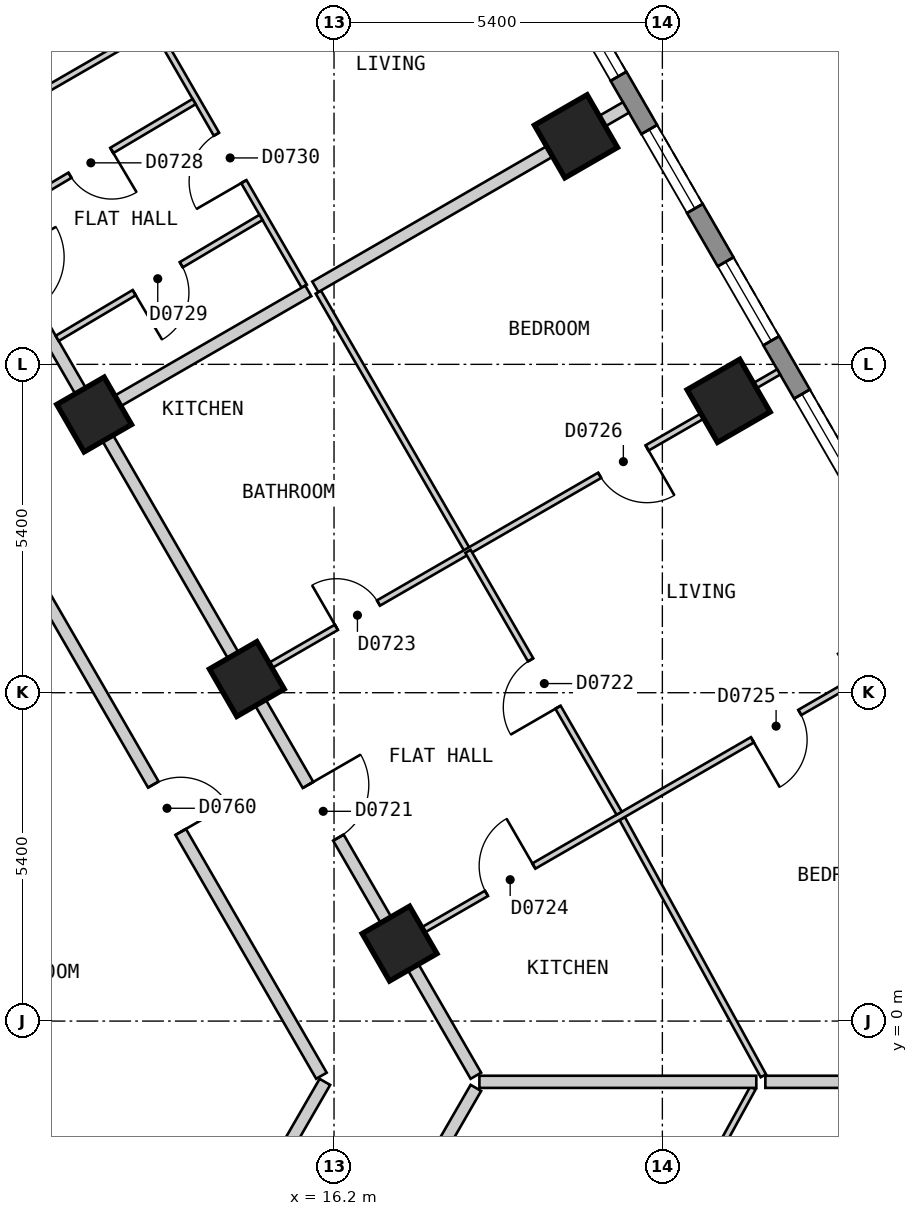
"""IFC4 building model, lengths in metres.
Left out: names, types, materials, properties, quantities, classifications, styles, units other than length and angle.
Written with IfcOpenShell. Run it as: python <this file> out.ifc"""

import sys

from ifc_helpers import new_model, si_unit, direction, frame, frame_2d, origin, origin_2d, place, context, subcontext, project, spatial, polyline, rectangle, outline, extrude, element, fill, save


model = new_model("IFC4")
c1 = context("Model", 3, precision=1e-05, world=origin(), true_north=direction((0.0, 1.0)))
c2 = subcontext(c1, "Body", "Model", "MODEL_VIEW")
j1 = project(units=[si_unit("LENGTHUNIT", "METRE"), si_unit("PLANEANGLEUNIT", "RADIAN")], contexts=[c1])
p1 = place(None, origin())
s1 = spatial("IfcSite", under=j1, at=p1, CompositionType="ELEMENT")
p2 = place(p1, origin())
s2 = spatial("IfcBuilding", under=s1, at=p2, CompositionType="ELEMENT")
p3 = place(p2, frame((0.0, 0.0, 105.0)))
s3 = spatial("IfcBuildingStorey", under=s2, at=p3, CompositionType="ELEMENT", Elevation=105.0)
for number, where, z_axis, x_axis in (
    (1, (22.69, 10.2, 0.0), (0.0, 0.0, 1.0), (-0.5, 0.866, 0.0)),
    (2, (20.179, 14.55, 0.0), (0.0, 0.0, 1.0), (-0.5, 0.866, 0.0)),
):
    element("IfcColumn", number, at=place(p3, frame(where, z_axis=z_axis, x_axis=x_axis)), inside=s3, PredefinedType="COLUMN", context=c2, shape_type="SweptSolid", body=[
        extrude(rectangle(XDim=1.0, YDim=1.0, at=origin_2d()), origin(), (0.0, 0.0, 1.0), 3.0),
    ])
for number, where, z_axis, x_axis in (
    (3, (17.278, 1.274, 0.0), (0.0, 0.0, 1.0), (-0.5, 0.866, 0.0)),
    (4, (14.766, 5.625, 0.0), (0.0, 0.0, 1.0), (-0.5, 0.866, 0.0)),
    (5, (12.255, 9.975, 0.0), (0.0, 0.0, 1.0), (-0.5, 0.866, 0.0)),
):
    element("IfcColumn", number, at=place(p3, frame(where, z_axis=z_axis, x_axis=x_axis)), inside=s3, PredefinedType="COLUMN", context=c2, shape_type="SweptSolid", body=[
        extrude(rectangle(XDim=0.9, YDim=0.9, at=origin_2d()), origin(), (0.0, 0.0, 1.0), 3.0),
    ])
p4 = place(p3, frame((29.027, 1.425, 0.0), z_axis=(0.0, 0.0, 1.0), x_axis=(-0.500027479704, 0.866009537788, 0.0)))
e6 = element("IfcWall", 6, at=p4, inside=s3, PredefinedType="SOLIDWALL", context=c2, shape_type="SweptSolid", body=[
    extrude(outline(polyline([(0.0, -0.15), (26.559, -0.15), (26.478, 0.15), (0.08, 0.15), (0.0, -0.15)])), origin(), (0.0, 0.0, 1.0), 2.6),
])
p5 = place(p4, frame((1.227, 0.0, 0.15)))
e7 = element("IfcOpeningElement", 7, at=p5, cuts=e6, PredefinedType="OPENING", context=c2, shape_type="SweptSolid", body=[
    extrude(rectangle(XDim=1.5, YDim=2.1, at=frame_2d((0.75, 1.05))), frame((0.0, 0.16, 0.0), z_axis=(0.0, -1.0, 0.0), x_axis=(1.0, 0.0, 0.0)), (0.0, 0.0, 1.0), 0.32),
])
p6 = place(p4, frame((3.738, 0.0, 0.15)))
e8 = element("IfcOpeningElement", 8, at=p6, cuts=e6, PredefinedType="OPENING", context=c2, shape_type="SweptSolid", body=[
    extrude(rectangle(XDim=1.5, YDim=2.1, at=frame_2d((0.75, 1.05))), frame((0.0, 0.16, 0.0), z_axis=(0.0, -1.0, 0.0), x_axis=(1.0, 0.0, 0.0)), (0.0, 0.0, 1.0), 0.32),
])
p7 = place(p4, frame((6.25, 0.0, 0.15)))
e9 = element("IfcOpeningElement", 9, at=p7, cuts=e6, PredefinedType="OPENING", context=c2, shape_type="SweptSolid", body=[
    extrude(rectangle(XDim=1.5, YDim=2.1, at=frame_2d((0.75, 1.05))), frame((0.0, 0.16, 0.0), z_axis=(0.0, -1.0, 0.0), x_axis=(1.0, 0.0, 0.0)), (0.0, 0.0, 1.0), 0.32),
])
p8 = place(p4, frame((8.761, 0.0, 0.15)))
e10 = element("IfcOpeningElement", 10, at=p8, cuts=e6, PredefinedType="OPENING", context=c2, shape_type="SweptSolid", body=[
    extrude(rectangle(XDim=1.5, YDim=2.1, at=frame_2d((0.75, 1.05))), frame((0.0, 0.16, 0.0), z_axis=(0.0, -1.0, 0.0), x_axis=(1.0, 0.0, 0.0)), (0.0, 0.0, 1.0), 0.32),
])
p9 = place(p4, frame((11.273, 0.0, 0.15)))
e11 = element("IfcOpeningElement", 11, at=p9, cuts=e6, PredefinedType="OPENING", context=c2, shape_type="SweptSolid", body=[
    extrude(rectangle(XDim=1.5, YDim=2.1, at=frame_2d((0.75, 1.05))), frame((0.0, 0.16, 0.0), z_axis=(0.0, -1.0, 0.0), x_axis=(1.0, 0.0, 0.0)), (0.0, 0.0, 1.0), 0.32),
])
p10 = place(p4, frame((13.785, 0.0, 0.15)))
e12 = element("IfcOpeningElement", 12, at=p10, cuts=e6, PredefinedType="OPENING", context=c2, shape_type="SweptSolid", body=[
    extrude(rectangle(XDim=1.5, YDim=2.1, at=frame_2d((0.75, 1.05))), frame((0.0, 0.16, 0.0), z_axis=(0.0, -1.0, 0.0), x_axis=(1.0, 0.0, 0.0)), (0.0, 0.0, 1.0), 0.32),
])
p11 = place(p4, frame((16.296, 0.0, 0.15)))
e13 = element("IfcOpeningElement", 13, at=p11, cuts=e6, PredefinedType="OPENING", context=c2, shape_type="SweptSolid", body=[
    extrude(rectangle(XDim=1.5, YDim=2.1, at=frame_2d((0.75, 1.05))), frame((0.0, 0.16, 0.0), z_axis=(0.0, -1.0, 0.0), x_axis=(1.0, 0.0, 0.0)), (0.0, 0.0, 1.0), 0.32),
])
p12 = place(p4, frame((18.807, 0.0, 0.15)))
e14 = element("IfcOpeningElement", 14, at=p12, cuts=e6, PredefinedType="OPENING", context=c2, shape_type="SweptSolid", body=[
    extrude(rectangle(XDim=1.5, YDim=2.1, at=frame_2d((0.75, 1.05))), frame((0.0, 0.16, 0.0), z_axis=(0.0, -1.0, 0.0), x_axis=(1.0, 0.0, 0.0)), (0.0, 0.0, 1.0), 0.32),
])
p13 = place(p4, frame((21.319, 0.0, 0.15)))
e15 = element("IfcOpeningElement", 15, at=p13, cuts=e6, PredefinedType="OPENING", context=c2, shape_type="SweptSolid", body=[
    extrude(rectangle(XDim=1.5, YDim=2.1, at=frame_2d((0.75, 1.05))), frame((0.0, 0.16, 0.0), z_axis=(0.0, -1.0, 0.0), x_axis=(1.0, 0.0, 0.0)), (0.0, 0.0, 1.0), 0.32),
])
p14 = place(p4, frame((23.831, 0.0, 0.15)))
e16 = element("IfcOpeningElement", 16, at=p14, cuts=e6, PredefinedType="OPENING", context=c2, shape_type="SweptSolid", body=[
    extrude(rectangle(XDim=1.5, YDim=2.1, at=frame_2d((0.75, 1.05))), frame((0.0, 0.16, 0.0), z_axis=(0.0, -1.0, 0.0), x_axis=(1.0, 0.0, 0.0)), (0.0, 0.0, 1.0), 0.32),
])
p15 = place(p3, frame((10.913, 7.899, 0.0), z_axis=(0.0, 0.0, 1.0), x_axis=(0.500028940566, -0.866008694296, 0.0)))
e17 = element("IfcWall", 17, at=p15, inside=s3, PredefinedType="PARTITIONING", context=c2, shape_type="SweptSolid", body=[
    extrude(rectangle(XDim=10.159, YDim=0.2, at=frame_2d((5.08, 0.0))), origin(), (0.0, 0.0, 1.0), 2.6),
])
p16 = place(p15, frame((4.63, 0.0, 0.0)))
e18 = element("IfcOpeningElement", 18, at=p16, cuts=e17, PredefinedType="OPENING", context=c2, shape_type="SweptSolid", body=[
    extrude(rectangle(XDim=0.9, YDim=2.1, at=frame_2d((0.45, 1.05))), frame((0.0, 0.11, 0.0), z_axis=(0.0, -1.0, 0.0), x_axis=(1.0, 0.0, 0.0)), (0.0, 0.0, 1.0), 0.22),
])
p17 = place(p3, frame((8.488, 16.5, 0.0), z_axis=(0.0, 0.0, 1.0), x_axis=(0.499986836607, -0.86603300354, 0.0)))
e19 = element("IfcWall", 19, at=p17, inside=s3, PredefinedType="PARTITIONING", context=c2, shape_type="SweptSolid", body=[
    extrude(rectangle(XDim=20.09, YDim=0.2, at=frame_2d((10.045, 0.0))), origin(), (0.0, 0.0, 1.0), 2.6),
])
p18 = place(p17, frame((14.569, 0.0, 0.0)))
e20 = element("IfcOpeningElement", 20, at=p18, cuts=e19, PredefinedType="OPENING", context=c2, shape_type="SweptSolid", body=[
    extrude(rectangle(XDim=1.0, YDim=2.1, at=frame_2d((0.5, 1.05))), frame((0.0, 0.11, 0.0), z_axis=(0.0, -1.0, 0.0), x_axis=(1.0, 0.0, 0.0)), (0.0, 0.0, 1.0), 0.22),
])
p19 = place(p17, frame((4.547, 0.0, 0.0)))
e21 = element("IfcOpeningElement", 21, at=p19, cuts=e19, PredefinedType="OPENING", context=c2, shape_type="SweptSolid", body=[
    extrude(rectangle(XDim=1.0, YDim=2.1, at=frame_2d((0.5, 1.05))), frame((0.0, 0.11, 0.0), z_axis=(0.0, -1.0, 0.0), x_axis=(1.0, 0.0, 0.0)), (0.0, 0.0, 1.0), 0.22),
])
p20 = place(p3, frame((15.011, -2.8, 0.0), z_axis=(0.0, 0.0, 1.0), x_axis=(0.499929208183, 0.866066271601, 0.0)))
e22 = element("IfcWall", 22, at=p20, inside=s3, PredefinedType="PARTITIONING", context=c2, shape_type="SweptSolid", body=[
    extrude(rectangle(XDim=2.078, YDim=0.2, at=frame_2d((1.039, 0.0))), origin(), (0.0, 0.0, 1.0), 2.6),
])
p21 = place(p3, frame((15.771, -5.884, 0.0), z_axis=(0.0, 0.0, 1.0), x_axis=(0.499917542299, 0.866073005526, 0.0)))
e23 = element("IfcWall", 23, at=p21, inside=s3, PredefinedType="PARTITIONING", context=c2, shape_type="SweptSolid", body=[
    extrude(rectangle(XDim=5.525, YDim=0.2, at=frame_2d((2.762, 0.0))), origin(), (0.0, 0.0, 1.0), 2.6),
])
p22 = place(p3, frame((13.273, 16.305, 0.0), z_axis=(0.0, 0.0, 1.0), x_axis=(0.500093956194, -0.865971151354, 0.0)))
e24 = element("IfcWall", 24, at=p22, inside=s3, PredefinedType="PARTITIONING", context=c2, shape_type="SweptSolid", body=[
    extrude(rectangle(XDim=4.873, YDim=0.1, at=frame_2d((2.437, 0.0))), origin(), (0.0, 0.0, 1.0), 2.6),
])
p23 = place(p22, frame((1.987, 0.0, 0.0)))
e25 = element("IfcOpeningElement", 25, at=p23, cuts=e24, PredefinedType="OPENING", context=c2, shape_type="SweptSolid", body=[
    extrude(rectangle(XDim=0.9, YDim=2.1, at=frame_2d((0.45, 1.05))), frame((0.0, 0.06, 0.0), z_axis=(0.0, -1.0, 0.0), x_axis=(1.0, 0.0, 0.0)), (0.0, 0.0, 1.0), 0.12),
])
p24 = place(p3, frame((15.942, 11.988, 0.0), z_axis=(0.0, 0.0, 1.0), x_axis=(0.499995794706, -0.866027831699, 0.0)))
e26 = element("IfcWall", 26, at=p24, inside=s3, PredefinedType="PARTITIONING", context=c2, shape_type="SweptSolid", body=[
    extrude(rectangle(XDim=4.922, YDim=0.1, at=frame_2d((2.461, 0.0))), origin(), (0.0, 0.0, 1.0), 2.6),
])
p25 = place(p3, frame((20.939, 3.331, 0.0), z_axis=(0.0, 0.0, 1.0), x_axis=(0.481207738216, -0.876606589458, 0.0)))
e27 = element("IfcWall", 27, at=p25, inside=s3, PredefinedType="PARTITIONING", context=c2, shape_type="SweptSolid", body=[
    extrude(rectangle(XDim=4.825, YDim=0.1, at=frame_2d((2.413, 0.0))), origin(), (0.0, 0.0, 1.0), 2.6),
])
p26 = place(p3, frame((20.812, -5.248, 0.0), z_axis=(0.0, 0.0, 1.0), x_axis=(0.481296891345, 0.876557643502, 0.0)))
e28 = element("IfcWall", 28, at=p26, inside=s3, PredefinedType="PARTITIONING", context=c2, shape_type="SweptSolid", body=[
    extrude(rectangle(XDim=4.733, YDim=0.1, at=frame_2d((2.367, 0.0))), origin(), (0.0, 0.0, 1.0), 2.6),
])
p27 = place(p3, frame((17.365, 1.325, 0.0), z_axis=(0.0, 0.0, 1.0), x_axis=(0.866016855193, 0.500014806302, 0.0)))
e29 = element("IfcWall", 29, at=p27, inside=s3, PredefinedType="PARTITIONING", context=c2, shape_type="SweptSolid", body=[
    extrude(rectangle(XDim=10.0, YDim=0.1, at=frame_2d((5.0, 0.0))), origin(), (0.0, 0.0, 1.0), 2.6),
])
p28 = place(p27, frame((1.55, 0.0, 0.0)))
e30 = element("IfcOpeningElement", 30, at=p28, cuts=e29, PredefinedType="OPENING", context=c2, shape_type="SweptSolid", body=[
    extrude(rectangle(XDim=0.9, YDim=2.1, at=frame_2d((0.45, 1.05))), frame((0.0, 0.06, 0.0), z_axis=(0.0, -1.0, 0.0), x_axis=(1.0, 0.0, 0.0)), (0.0, 0.0, 1.0), 0.12),
])
p29 = place(p27, frame((6.6, 0.0, 0.0)))
e31 = element("IfcOpeningElement", 31, at=p29, cuts=e29, PredefinedType="OPENING", context=c2, shape_type="SweptSolid", body=[
    extrude(rectangle(XDim=0.9, YDim=2.1, at=frame_2d((0.45, 1.05))), frame((0.0, 0.06, 0.0), z_axis=(0.0, -1.0, 0.0), x_axis=(1.0, 0.0, 0.0)), (0.0, 0.0, 1.0), 0.12),
])
p30 = place(p3, frame((14.853, 5.675, 0.0), z_axis=(0.0, 0.0, 1.0), x_axis=(0.866016855193, 0.500014806302, 0.0)))
e32 = element("IfcWall", 32, at=p30, inside=s3, PredefinedType="PARTITIONING", context=c2, shape_type="SweptSolid", body=[
    extrude(rectangle(XDim=10.0, YDim=0.1, at=frame_2d((5.0, 0.0))), origin(), (0.0, 0.0, 1.0), 2.6),
])
p31 = place(p30, frame((1.6, 0.0, 0.0)))
e33 = element("IfcOpeningElement", 33, at=p31, cuts=e32, PredefinedType="OPENING", context=c2, shape_type="SweptSolid", body=[
    extrude(rectangle(XDim=0.8, YDim=2.1, at=frame_2d((0.4, 1.05))), frame((0.0, 0.06, 0.0), z_axis=(0.0, -1.0, 0.0), x_axis=(1.0, 0.0, 0.0)), (0.0, 0.0, 1.0), 0.12),
])
p32 = place(p30, frame((6.6, 0.0, 0.0)))
e34 = element("IfcOpeningElement", 34, at=p32, cuts=e32, PredefinedType="OPENING", context=c2, shape_type="SweptSolid", body=[
    extrude(rectangle(XDim=0.9, YDim=2.1, at=frame_2d((0.45, 1.05))), frame((0.0, 0.06, 0.0), z_axis=(0.0, -1.0, 0.0), x_axis=(1.0, 0.0, 0.0)), (0.0, 0.0, 1.0), 0.12),
])
p33 = place(p3, frame((9.83, 14.375, 0.0), z_axis=(0.0, 0.0, 1.0), x_axis=(0.866016855193, 0.500014806302, 0.0)))
e35 = element("IfcWall", 35, at=p33, inside=s3, PredefinedType="PARTITIONING", context=c2, shape_type="SweptSolid", body=[
    extrude(rectangle(XDim=10.0, YDim=0.1, at=frame_2d((5.0, 0.0))), origin(), (0.0, 0.0, 1.0), 2.6),
])
p34 = place(p33, frame((6.523, 0.0, 0.0)))
e36 = element("IfcOpeningElement", 36, at=p34, cuts=e35, PredefinedType="OPENING", context=c2, shape_type="SweptSolid", body=[
    extrude(rectangle(XDim=0.9, YDim=2.1, at=frame_2d((0.45, 1.05))), frame((0.0, 0.06, 0.0), z_axis=(0.0, -1.0, 0.0), x_axis=(1.0, 0.0, 0.0)), (0.0, 0.0, 1.0), 0.12),
])
p35 = place(p3, frame((11.647, 11.227, 0.0), z_axis=(0.0, 0.0, 1.0), x_axis=(0.859997349349, 0.510298500011, 0.0)))
e37 = element("IfcWall", 37, at=p35, inside=s3, PredefinedType="PARTITIONING", context=c2, shape_type="SweptSolid", body=[
    extrude(rectangle(XDim=3.898, YDim=0.1, at=frame_2d((1.949, 0.0))), origin(), (0.0, 0.0, 1.0), 2.6),
])
p36 = place(p35, frame((1.473, 0.0, 0.0)))
e38 = element("IfcOpeningElement", 38, at=p36, cuts=e37, PredefinedType="OPENING", context=c2, shape_type="SweptSolid", body=[
    extrude(rectangle(XDim=0.9, YDim=2.1, at=frame_2d((0.45, 1.05))), frame((0.0, 0.06, 0.0), z_axis=(0.0, -1.0, 0.0), x_axis=(1.0, 0.0, 0.0)), (0.0, 0.0, 1.0), 0.12),
])
p37 = place(p3, frame((10.547, 13.133, 0.0), z_axis=(0.0, 0.0, 1.0), x_axis=(0.860090994311, 0.510140648749, 0.0)))
e39 = element("IfcWall", 39, at=p37, inside=s3, PredefinedType="PARTITIONING", context=c2, shape_type="SweptSolid", body=[
    extrude(rectangle(XDim=3.897, YDim=0.1, at=frame_2d((1.948, 0.0))), origin(), (0.0, 0.0, 1.0), 2.6),
])
p38 = place(p37, frame((1.523, 0.0, 0.0)))
e40 = element("IfcOpeningElement", 40, at=p38, cuts=e39, PredefinedType="OPENING", context=c2, shape_type="SweptSolid", body=[
    extrude(rectangle(XDim=0.8, YDim=2.1, at=frame_2d((0.4, 1.05))), frame((0.0, 0.06, 0.0), z_axis=(0.0, -1.0, 0.0), x_axis=(1.0, 0.0, 0.0)), (0.0, 0.0, 1.0), 0.12),
])
p39 = place(p3, frame((18.591, -0.999, 0.0), z_axis=(0.0, 0.0, 1.0), x_axis=(1.0, 0.0, 0.0)))
e41 = element("IfcWall", 41, at=p39, inside=s3, PredefinedType="PARTITIONING", context=c2, shape_type="SweptSolid", body=[
    extrude(rectangle(XDim=4.554, YDim=0.2, at=frame_2d((2.277, 0.0))), origin(), (0.0, 0.0, 1.0), 2.6),
])
p40 = place(p3, frame((23.294, -0.999, 0.0), z_axis=(0.0, 0.0, 1.0), x_axis=(1.0, 0.0, 0.0)))
e42 = element("IfcWall", 42, at=p40, inside=s3, PredefinedType="PARTITIONING", context=c2, shape_type="SweptSolid", body=[
    extrude(rectangle(XDim=5.563, YDim=0.2, at=frame_2d((2.781, 0.0))), origin(), (0.0, 0.0, 1.0), 2.6),
])
p41 = place(p3, frame((12.342, 10.025, 0.0), z_axis=(0.0, 0.0, 1.0), x_axis=(0.866033886885, 0.499985306551, 0.0)))
e43 = element("IfcWall", 43, at=p41, inside=s3, PredefinedType="PARTITIONING", context=c2, shape_type="SweptSolid", body=[
    extrude(rectangle(XDim=3.966, YDim=0.2, at=frame_2d((1.983, 0.0))), origin(), (0.0, 0.0, 1.0), 2.6),
])
p42 = place(p3, frame((15.892, 12.075, 0.0), z_axis=(0.0, 0.0, 1.0), x_axis=(0.866000883696, 0.500042467634, 0.0)))
e44 = element("IfcWall", 44, at=p42, inside=s3, PredefinedType="PARTITIONING", context=c2, shape_type="SweptSolid", body=[
    extrude(rectangle(XDim=5.899, YDim=0.2, at=frame_2d((2.95, 0.0))), origin(), (0.0, 0.0, 1.0), 2.6),
])
p43 = place(p3, frame((18.403, 7.725, 0.0), z_axis=(0.0, 0.0, 1.0), x_axis=(0.500014231302, -0.866017187182, 0.0)))
e45 = element("IfcWall", 45, at=p43, inside=s3, PredefinedType="PARTITIONING", context=c2, shape_type="SweptSolid", body=[
    extrude(rectangle(XDim=4.973, YDim=0.1, at=frame_2d((2.487, 0.0))), origin(), (0.0, 0.0, 1.0), 2.6),
])
p44 = place(p43, frame((2.061, 0.0, 0.0)))
e46 = element("IfcOpeningElement", 46, at=p44, cuts=e45, PredefinedType="OPENING", context=c2, shape_type="SweptSolid", body=[
    extrude(rectangle(XDim=0.9, YDim=2.1, at=frame_2d((0.45, 1.05))), frame((0.0, 0.06, 0.0), z_axis=(0.0, -1.0, 0.0), x_axis=(1.0, 0.0, 0.0)), (0.0, 0.0, 1.0), 0.12),
])
p45 = place(p8, origin())
e47 = element("IfcWindow", 47, at=p45, inside=s3, PartitioningType="SINGLE_PANEL", PredefinedType="WINDOW", context=c2, shape_type="SweptSolid", body=[
    extrude(rectangle(XDim=1.5, YDim=2.1, at=frame_2d((0.75, 1.05))), frame((0.0, 0.03, 0.0), z_axis=(0.0, -1.0, 0.0), x_axis=(1.0, 0.0, 0.0)), (0.0, 0.0, 1.0), 0.06),
])
fill(e10, e47)
p46 = place(p9, origin())
e48 = element("IfcWindow", 48, at=p46, inside=s3, PartitioningType="SINGLE_PANEL", PredefinedType="WINDOW", context=c2, shape_type="SweptSolid", body=[
    extrude(rectangle(XDim=1.5, YDim=2.1, at=frame_2d((0.75, 1.05))), frame((0.0, 0.03, 0.0), z_axis=(0.0, -1.0, 0.0), x_axis=(1.0, 0.0, 0.0)), (0.0, 0.0, 1.0), 0.06),
])
fill(e11, e48)
p47 = place(p10, origin())
e49 = element("IfcWindow", 49, at=p47, inside=s3, PartitioningType="SINGLE_PANEL", PredefinedType="WINDOW", context=c2, shape_type="SweptSolid", body=[
    extrude(rectangle(XDim=1.5, YDim=2.1, at=frame_2d((0.75, 1.05))), frame((0.0, 0.03, 0.0), z_axis=(0.0, -1.0, 0.0), x_axis=(1.0, 0.0, 0.0)), (0.0, 0.0, 1.0), 0.06),
])
fill(e12, e49)
p48 = place(p11, origin())
e50 = element("IfcWindow", 50, at=p48, inside=s3, PartitioningType="SINGLE_PANEL", PredefinedType="WINDOW", context=c2, shape_type="SweptSolid", body=[
    extrude(rectangle(XDim=1.5, YDim=2.1, at=frame_2d((0.75, 1.05))), frame((0.0, 0.03, 0.0), z_axis=(0.0, -1.0, 0.0), x_axis=(1.0, 0.0, 0.0)), (0.0, 0.0, 1.0), 0.06),
])
fill(e13, e50)
p49 = place(p18, origin())
e51 = element("IfcDoor", 51, at=p49, inside=s3, OperationType="SINGLE_SWING_LEFT", PredefinedType="DOOR", context=c2, shape_type="SweptSolid", body=[
    extrude(rectangle(XDim=1.0, YDim=2.1, at=frame_2d((0.5, 1.05))), frame((0.0, 0.025, 0.0), z_axis=(0.0, -1.0, 0.0), x_axis=(1.0, 0.0, 0.0)), (0.0, 0.0, 1.0), 0.05),
])
fill(e20, e51)
p50 = place(p44, origin())
e52 = element("IfcDoor", 52, at=p50, inside=s3, OperationType="SINGLE_SWING_RIGHT", PredefinedType="DOOR", context=c2, shape_type="SweptSolid", body=[
    extrude(rectangle(XDim=0.9, YDim=2.1, at=frame_2d((0.45, 1.05))), frame((0.0, 0.025, 0.0), z_axis=(0.0, -1.0, 0.0), x_axis=(1.0, 0.0, 0.0)), (0.0, 0.0, 1.0), 0.05),
])
fill(e46, e52)
p51 = place(p31, origin())
e53 = element("IfcDoor", 53, at=p51, inside=s3, OperationType="SINGLE_SWING_LEFT", PredefinedType="DOOR", context=c2, shape_type="SweptSolid", body=[
    extrude(rectangle(XDim=0.8, YDim=2.1, at=frame_2d((0.4, 1.05))), frame((0.0, 0.025, 0.0), z_axis=(0.0, -1.0, 0.0), x_axis=(1.0, 0.0, 0.0)), (0.0, 0.0, 1.0), 0.05),
])
fill(e33, e53)
p52 = place(p28, origin())
e54 = element("IfcDoor", 54, at=p52, inside=s3, OperationType="SINGLE_SWING_RIGHT", PredefinedType="DOOR", context=c2, shape_type="SweptSolid", body=[
    extrude(rectangle(XDim=0.9, YDim=2.1, at=frame_2d((0.45, 1.05))), frame((0.0, 0.025, 0.0), z_axis=(0.0, -1.0, 0.0), x_axis=(1.0, 0.0, 0.0)), (0.0, 0.0, 1.0), 0.05),
])
fill(e30, e54)
p53 = place(p29, origin())
e55 = element("IfcDoor", 55, at=p53, inside=s3, OperationType="SINGLE_SWING_LEFT", PredefinedType="DOOR", context=c2, shape_type="SweptSolid", body=[
    extrude(rectangle(XDim=0.9, YDim=2.1, at=frame_2d((0.45, 1.05))), frame((0.0, 0.025, 0.0), z_axis=(0.0, -1.0, 0.0), x_axis=(1.0, 0.0, 0.0)), (0.0, 0.0, 1.0), 0.05),
])
fill(e31, e55)
p54 = place(p32, origin())
e56 = element("IfcDoor", 56, at=p54, inside=s3, OperationType="SINGLE_SWING_RIGHT", PredefinedType="DOOR", context=c2, shape_type="SweptSolid", body=[
    extrude(rectangle(XDim=0.9, YDim=2.1, at=frame_2d((0.45, 1.05))), frame((0.0, 0.025, 0.0), z_axis=(0.0, -1.0, 0.0), x_axis=(1.0, 0.0, 0.0)), (0.0, 0.0, 1.0), 0.05),
])
fill(e34, e56)
p55 = place(p38, origin())
e57 = element("IfcDoor", 57, at=p55, inside=s3, OperationType="SINGLE_SWING_RIGHT", PredefinedType="DOOR", context=c2, shape_type="SweptSolid", body=[
    extrude(rectangle(XDim=0.8, YDim=2.1, at=frame_2d((0.4, 1.05))), frame((0.0, 0.025, 0.0), z_axis=(0.0, -1.0, 0.0), x_axis=(1.0, 0.0, 0.0)), (0.0, 0.0, 1.0), 0.05),
])
fill(e40, e57)
p56 = place(p36, origin())
e58 = element("IfcDoor", 58, at=p56, inside=s3, OperationType="SINGLE_SWING_LEFT", PredefinedType="DOOR", context=c2, shape_type="SweptSolid", body=[
    extrude(rectangle(XDim=0.9, YDim=2.1, at=frame_2d((0.45, 1.05))), frame((0.0, 0.025, 0.0), z_axis=(0.0, -1.0, 0.0), x_axis=(1.0, 0.0, 0.0)), (0.0, 0.0, 1.0), 0.05),
])
fill(e38, e58)
p57 = place(p23, origin())
e59 = element("IfcDoor", 59, at=p57, inside=s3, OperationType="SINGLE_SWING_RIGHT", PredefinedType="DOOR", context=c2, shape_type="SweptSolid", body=[
    extrude(rectangle(XDim=0.9, YDim=2.1, at=frame_2d((0.45, 1.05))), frame((0.0, 0.025, 0.0), z_axis=(0.0, -1.0, 0.0), x_axis=(1.0, 0.0, 0.0)), (0.0, 0.0, 1.0), 0.05),
])
fill(e25, e59)
p58 = place(p16, origin())
e60 = element("IfcDoor", 60, at=p58, inside=s3, OperationType="SINGLE_SWING_RIGHT", PredefinedType="DOOR", context=c2, shape_type="SweptSolid", body=[
    extrude(rectangle(XDim=0.9, YDim=2.1, at=frame_2d((0.45, 1.05))), frame((0.0, 0.025, 0.0), z_axis=(0.0, -1.0, 0.0), x_axis=(1.0, 0.0, 0.0)), (0.0, 0.0, 1.0), 0.05),
])
fill(e18, e60)
save(model, sys.argv[1])
